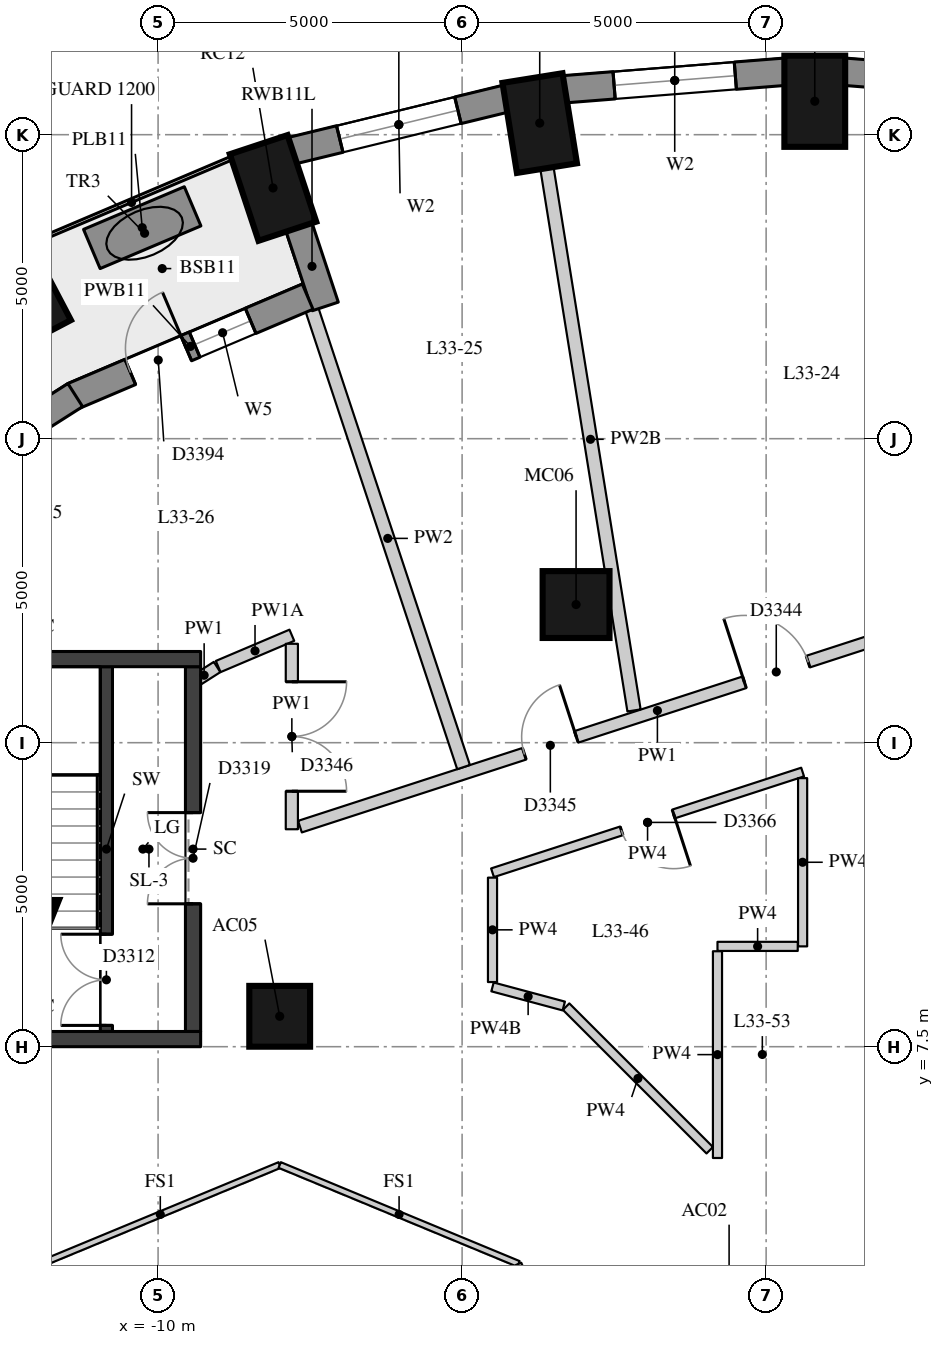
"""IFC4 building model, lengths in metres.
Left out: names, types, materials, properties, quantities, classifications, styles, units other than length and angle.
Written with IfcOpenShell. Run it as: python <this file> out.ifc"""

import sys

from ifc_helpers import new_model, si_unit, direction, frame, frame_2d, origin, origin_2d, place, context, subcontext, project, spatial, rectangle, extrude, element, fill, save


model = new_model("IFC4")
c1 = context("Model", 3, precision=1e-05, world=origin(), true_north=direction((0.0, 1.0)))
c2 = subcontext(c1, "Body", "Model", "MODEL_VIEW")
j1 = project(units=[si_unit("LENGTHUNIT", "METRE"), si_unit("PLANEANGLEUNIT", "RADIAN")], contexts=[c1])
p1 = place(None, origin())
s1 = spatial("IfcSite", under=j1, at=p1, CompositionType="ELEMENT")
p2 = place(p1, origin())
s2 = spatial("IfcBuilding", under=s1, at=p2, CompositionType="ELEMENT")
p3 = place(p2, frame((0.0, 0.0, 118.6)))
s3 = spatial("IfcBuildingStorey", under=s2, at=p3, CompositionType="ELEMENT", Elevation=118.6)
for number, where, z_axis, x_axis in (
    (1, (0.8, 23.05, 0.0), (0.0, 0.0, 1.0), (0.0, 1.0, 0.0)),
    (2, (-3.724, 22.691, 0.0), (0.0, 0.0, 1.0), (-0.159, 0.987, 0.0)),
    (3, (-8.11, 21.624, 0.0), (0.0, 0.0, 1.0), (-0.315, 0.949, 0.0)),
    (4, (-12.225, 19.882, 0.0), (0.0, 0.0, 1.0), (-0.465, 0.885, 0.0)),
):
    element("IfcColumn", number, at=place(p3, frame(where, z_axis=z_axis, x_axis=x_axis)), inside=s3, PredefinedType="COLUMN", context=c2, shape_type="SweptSolid", body=[
        extrude(rectangle(XDim=1.5, YDim=1.0, at=origin_2d()), origin(), (0.0, 0.0, 1.0), 3.3),
    ])
p4 = place(p3, frame((-8.0, 8.0, 0.0), z_axis=(0.0, 0.0, 1.0), x_axis=(1.0, 0.0, 0.0)))
e5 = element("IfcColumn", 5, at=p4, inside=s3, PredefinedType="COLUMN", context=c2, shape_type="SweptSolid", body=[
    extrude(rectangle(XDim=1.0, YDim=1.0, at=origin_2d()), origin(), (0.0, 0.0, 1.0), 3.3),
])
p5 = place(p3, frame((-3.126, 14.772, 0.0), z_axis=(0.0, 0.0, 1.0), x_axis=(1.0, 0.0, 0.0)))
e6 = element("IfcColumn", 6, at=p5, inside=s3, PredefinedType="COLUMN", context=c2, shape_type="SweptSolid", body=[
    extrude(rectangle(XDim=1.1, YDim=1.1, at=origin_2d()), origin(), (0.0, 0.0, 1.0), 3.3),
])
p6 = place(p3, frame((4.927, 23.247, 0.0), z_axis=(0.0, 0.0, 1.0), x_axis=(-0.996862216754, 0.079156306178, 0.0)))
e7 = element("IfcWall", 7, at=p6, inside=s3, PredefinedType="SOLIDWALL", context=c2, shape_type="SweptSolid", body=[
    extrude(rectangle(XDim=3.658, YDim=0.45, at=frame_2d((1.829, 0.0))), origin(), (0.0, 0.0, 1.0), 3.02),
])
p7 = place(p6, frame((0.829, 0.0, 0.4)))
e8 = element("IfcOpeningElement", 8, at=p7, cuts=e7, PredefinedType="OPENING", context=c2, shape_type="SweptSolid", body=[
    extrude(rectangle(XDim=2.0, YDim=1.75, at=frame_2d((1.0, 0.875))), frame((0.0, 0.235, 0.0), z_axis=(0.0, -1.0, 0.0), x_axis=(1.0, 0.0, 0.0)), (0.0, 0.0, 1.0), 0.47),
])
p8 = place(p3, frame((0.32, 23.536, 0.0), z_axis=(0.0, 0.0, 1.0), x_axis=(-0.996862216754, -0.079156306178, 0.0)))
e9 = element("IfcWall", 9, at=p8, inside=s3, PredefinedType="SOLIDWALL", context=c2, shape_type="SweptSolid", body=[
    extrude(rectangle(XDim=3.658, YDim=0.45, at=frame_2d((1.829, 0.0))), origin(), (0.0, 0.0, 1.0), 3.02),
])
p9 = place(p8, frame((0.829, 0.0, 0.4)))
e10 = element("IfcOpeningElement", 10, at=p9, cuts=e9, PredefinedType="OPENING", context=c2, shape_type="SweptSolid", body=[
    extrude(rectangle(XDim=2.0, YDim=1.75, at=frame_2d((1.0, 0.875))), frame((0.0, 0.235, 0.0), z_axis=(0.0, -1.0, 0.0), x_axis=(1.0, 0.0, 0.0)), (0.0, 0.0, 1.0), 0.47),
])
p10 = place(p3, frame((-4.275, 23.094, 0.0), z_axis=(0.0, 0.0, 1.0), x_axis=(-0.971667603162, -0.236351579148, 0.0)))
e11 = element("IfcWall", 11, at=p10, inside=s3, PredefinedType="SOLIDWALL", context=c2, shape_type="SweptSolid", body=[
    extrude(rectangle(XDim=3.635, YDim=0.45, at=frame_2d((1.817, 0.0))), origin(), (0.0, 0.0, 1.0), 3.02),
])
p11 = place(p10, frame((0.817, 0.0, 0.4)))
e12 = element("IfcOpeningElement", 12, at=p11, cuts=e11, PredefinedType="OPENING", context=c2, shape_type="SweptSolid", body=[
    extrude(rectangle(XDim=2.0, YDim=1.75, at=frame_2d((1.0, 0.875))), frame((0.0, 0.235, 0.0), z_axis=(0.0, -1.0, 0.0), x_axis=(1.0, 0.0, 0.0)), (0.0, 0.0, 1.0), 0.47),
])
p12 = place(p3, frame((-7.687, 20.995, 0.0), z_axis=(0.0, 0.0, 1.0), x_axis=(0.314541283205, -0.949243794375, 0.0)))
e13 = element("IfcWall", 13, at=p12, inside=s3, PredefinedType="SOLIDWALL", context=c2, shape_type="SweptSolid", body=[
    extrude(rectangle(XDim=1.39, YDim=0.45, at=frame_2d((0.695, 0.0))), origin(), (0.0, 0.0, 1.0), 3.02),
])
p13 = place(p3, frame((-7.54, 19.836, 0.0), z_axis=(0.0, 0.0, 1.0), x_axis=(-0.920502375708, -0.390736965637, 0.0)))
e14 = element("IfcWall", 14, at=p13, inside=s3, PredefinedType="SOLIDWALL", context=c2, shape_type="SweptSolid", body=[
    extrude(rectangle(XDim=4.188, YDim=0.45, at=frame_2d((2.094, 0.0))), origin(), (0.0, 0.0, 1.0), 3.02),
])
p14 = place(p13, frame((1.019, 0.0, 0.4)))
e15 = element("IfcOpeningElement", 15, at=p14, cuts=e14, PredefinedType="OPENING", context=c2, shape_type="SweptSolid", body=[
    extrude(rectangle(XDim=1.0, YDim=1.75, at=frame_2d((0.5, 0.875))), frame((0.0, 0.235, 0.0), z_axis=(0.0, -1.0, 0.0), x_axis=(1.0, 0.0, 0.0)), (0.0, 0.0, 1.0), 0.47),
])
p15 = place(p13, frame((2.169, 0.0, 0.0)))
e16 = element("IfcOpeningElement", 16, at=p15, cuts=e14, PredefinedType="OPENING", context=c2, shape_type="SweptSolid", body=[
    extrude(rectangle(XDim=1.0, YDim=2.15, at=frame_2d((0.5, 1.075))), frame((0.0, 0.235, 0.0), z_axis=(0.0, -1.0, 0.0), x_axis=(1.0, 0.0, 0.0)), (0.0, 0.0, 1.0), 0.47),
])
p16 = place(p3, frame((-11.362, 18.217, 0.0), z_axis=(0.0, 0.0, 1.0), x_axis=(-0.843284405788, -0.537467590609, 0.0)))
e17 = element("IfcWall", 17, at=p16, inside=s3, PredefinedType="SOLIDWALL", context=c2, shape_type="SweptSolid", body=[
    extrude(rectangle(XDim=4.135, YDim=0.45, at=frame_2d((2.067, 0.0))), origin(), (0.0, 0.0, 1.0), 3.02),
])
p17 = place(p16, frame((0.992, 0.0, 0.4)))
e18 = element("IfcOpeningElement", 18, at=p17, cuts=e17, PredefinedType="OPENING", context=c2, shape_type="SweptSolid", body=[
    extrude(rectangle(XDim=1.0, YDim=1.75, at=frame_2d((0.5, 0.875))), frame((0.0, 0.235, 0.0), z_axis=(0.0, -1.0, 0.0), x_axis=(1.0, 0.0, 0.0)), (0.0, 0.0, 1.0), 0.47),
])
p18 = place(p16, frame((2.142, 0.0, 0.0)))
e19 = element("IfcOpeningElement", 19, at=p18, cuts=e17, PredefinedType="OPENING", context=c2, shape_type="SweptSolid", body=[
    extrude(rectangle(XDim=1.0, YDim=2.15, at=frame_2d((0.5, 1.075))), frame((0.0, 0.235, 0.0), z_axis=(0.0, -1.0, 0.0), x_axis=(1.0, 0.0, 0.0)), (0.0, 0.0, 1.0), 0.47),
])
p19 = place(p3, frame((-9.432, 21.322, 0.0), z_axis=(0.0, 0.0, 1.0), x_axis=(-0.920903594752, -0.389790416984, 0.0)))
e20 = element("IfcWall", 20, at=p19, inside=s3, PredefinedType="USERDEFINED", context=c2, shape_type="SweptSolid", body=[
    extrude(rectangle(XDim=1.8, YDim=0.7, at=frame_2d((0.9, 0.0))), origin(), (0.0, 0.0, 1.0), 0.75),
])
p20 = place(p3, frame((-10.85, 7.75, 0.0), z_axis=(0.0, 0.0, 1.0), x_axis=(0.0, 1.0, 0.0)))
e21 = element("IfcWall", 21, at=p20, inside=s3, PredefinedType="SHEAR", context=c2, shape_type="SweptSolid", body=[
    extrude(rectangle(XDim=6.0, YDim=0.2, at=frame_2d((3.0, 0.0))), origin(), (0.0, 0.0, 1.0), 3.02),
])
p21 = place(p20, frame((0.1, 0.0, 0.0)))
e22 = element("IfcOpeningElement", 22, at=p21, cuts=e21, PredefinedType="OPENING", context=c2, shape_type="SweptSolid", body=[
    extrude(rectangle(XDim=1.5, YDim=2.1, at=frame_2d((0.75, 1.05))), frame((0.0, 0.11, 0.0), z_axis=(0.0, -1.0, 0.0), x_axis=(1.0, 0.0, 0.0)), (0.0, 0.0, 1.0), 0.22),
])
p22 = place(p3, frame((-9.425, 7.75, -0.28), z_axis=(0.0, 0.0, 1.0), x_axis=(0.0, 1.0, 0.0)))
e23 = element("IfcWall", 23, at=p22, inside=s3, PredefinedType="SHEAR", context=c2, shape_type="SweptSolid", body=[
    extrude(rectangle(XDim=6.0, YDim=0.25, at=frame_2d((3.0, 0.0))), origin(), (0.0, 0.0, 1.0), 3.3),
])
p23 = place(p22, frame((2.1, 0.0, 0.28)))
e24 = element("IfcOpeningElement", 24, at=p23, cuts=e23, PredefinedType="OPENING", context=c2, shape_type="SweptSolid", body=[
    extrude(rectangle(XDim=1.5, YDim=2.1, at=frame_2d((0.75, 1.05))), frame((0.0, 0.135, 0.0), z_axis=(0.0, -1.0, 0.0), x_axis=(1.0, 0.0, 0.0)), (0.0, 0.0, 1.0), 0.27),
])
for number, where, z_axis, x_axis in (
    (25, (-14.5, 13.875, -0.28), (0.0, 0.0, 1.0), (1.0, 0.0, 0.0)),
    (26, (-14.5, 7.625, -0.28), (0.0, 0.0, 1.0), (1.0, 0.0, 0.0)),
):
    element("IfcWall", number, at=place(p3, frame(where, z_axis=z_axis, x_axis=x_axis)), inside=s3, PredefinedType="SHEAR", context=c2, shape_type="SweptSolid", body=[
        extrude(rectangle(XDim=5.2, YDim=0.25, at=frame_2d((2.6, 0.0))), origin(), (0.0, 0.0, 1.0), 3.3),
    ])
p24 = place(p3, frame((-9.455, 13.474, 0.0), z_axis=(0.0, 0.0, 1.0), x_axis=(0.843342387181, 0.537376607216, 0.0)))
e27 = element("IfcWall", 27, at=p24, inside=s3, PredefinedType="PARTITIONING", context=c2, shape_type="SweptSolid", body=[
    extrude(rectangle(XDim=0.504, YDim=0.2, at=frame_2d((0.252, 0.0))), origin(), (0.0, 0.0, 1.0), 3.02),
])
p25 = place(p3, frame((-9.011, 13.752, 0.0), z_axis=(0.0, 0.0, 1.0), x_axis=(0.920454408747, 0.390849947446, 0.0)))
e28 = element("IfcWall", 28, at=p25, inside=s3, PredefinedType="PARTITIONING", context=c2, shape_type="SweptSolid", body=[
    extrude(rectangle(XDim=1.316, YDim=0.2, at=frame_2d((0.658, 0.0))), origin(), (0.0, 0.0, 1.0), 2.57),
])
p26 = place(p3, frame((-7.8, 14.127, 0.0), z_axis=(0.0, 0.0, 1.0), x_axis=(0.0, -1.0, 0.0)))
e29 = element("IfcWall", 29, at=p26, inside=s3, PredefinedType="PARTITIONING", context=c2, shape_type="SweptSolid", body=[
    extrude(rectangle(XDim=3.05, YDim=0.2, at=frame_2d((1.525, 0.0))), origin(), (0.0, 0.0, 1.0), 3.02),
])
p27 = place(p26, frame((0.625, 0.0, 0.0)))
e30 = element("IfcOpeningElement", 30, at=p27, cuts=e29, PredefinedType="OPENING", context=c2, shape_type="SweptSolid", body=[
    extrude(rectangle(XDim=1.8, YDim=2.1, at=frame_2d((0.9, 1.05))), frame((0.0, 0.11, 0.0), z_axis=(0.0, -1.0, 0.0), x_axis=(1.0, 0.0, 0.0)), (0.0, 0.0, 1.0), 0.22),
])
p28 = place(p3, frame((-7.667, 11.119, 0.0), z_axis=(0.0, 0.0, 1.0), x_axis=(0.951088334028, 0.308919052304, 0.0)))
e31 = element("IfcWall", 31, at=p28, inside=s3, PredefinedType="PARTITIONING", context=c2, shape_type="SweptSolid", body=[
    extrude(rectangle(XDim=12.362, YDim=0.2, at=frame_2d((6.181, 0.0))), origin(), (0.0, 0.0, 1.0), 3.02),
])
p29 = place(p28, frame((7.686, 0.0, 0.0)))
e32 = element("IfcOpeningElement", 32, at=p29, cuts=e31, PredefinedType="OPENING", context=c2, shape_type="SweptSolid", body=[
    extrude(rectangle(XDim=1.1, YDim=2.1, at=frame_2d((0.55, 1.05))), frame((0.0, 0.11, 0.0), z_axis=(0.0, -1.0, 0.0), x_axis=(1.0, 0.0, 0.0)), (0.0, 0.0, 1.0), 0.22),
])
p30 = place(p28, frame((3.88, 0.0, 0.0)))
e33 = element("IfcOpeningElement", 33, at=p30, cuts=e31, PredefinedType="OPENING", context=c2, shape_type="SweptSolid", body=[
    extrude(rectangle(XDim=0.9, YDim=2.1, at=frame_2d((0.45, 1.05))), frame((0.0, 0.11, 0.0), z_axis=(0.0, -1.0, 0.0), x_axis=(1.0, 0.0, 0.0)), (0.0, 0.0, 1.0), 0.22),
])
p31 = place(p3, frame((-4.5, 10.361, 0.0), z_axis=(0.0, 0.0, 1.0), x_axis=(0.951090931116, 0.308911056372, 0.0)))
e34 = element("IfcWall", 34, at=p31, inside=s3, PredefinedType="PARTITIONING", context=c2, shape_type="SweptSolid", body=[
    extrude(rectangle(XDim=5.362, YDim=0.15, at=frame_2d((2.681, 0.0))), origin(), (0.0, 0.0, 1.0), 3.02),
])
p32 = place(p31, frame((2.231, 0.0, 0.0)))
e35 = element("IfcOpeningElement", 35, at=p32, cuts=e34, PredefinedType="OPENING", context=c2, shape_type="SweptSolid", body=[
    extrude(rectangle(XDim=0.9, YDim=2.1, at=frame_2d((0.45, 1.05))), frame((0.0, 0.085, 0.0), z_axis=(0.0, -1.0, 0.0), x_axis=(1.0, 0.0, 0.0)), (0.0, 0.0, 1.0), 0.17),
])
p33 = place(p3, frame((0.6, 11.917, 0.0), z_axis=(0.0, 0.0, 1.0), x_axis=(0.0, -1.0, 0.0)))
e36 = element("IfcWall", 36, at=p33, inside=s3, PredefinedType="PARTITIONING", context=c2, shape_type="SweptSolid", body=[
    extrude(rectangle(XDim=2.767, YDim=0.15, at=frame_2d((1.384, 0.0))), origin(), (0.0, 0.0, 1.0), 3.02),
])
p34 = place(p3, frame((0.52, 9.15, 0.0), z_axis=(0.0, 0.0, 1.0), x_axis=(-1.0, 0.0, 0.0)))
e37 = element("IfcWall", 37, at=p34, inside=s3, PredefinedType="PARTITIONING", context=c2, shape_type="SweptSolid", body=[
    extrude(rectangle(XDim=1.32, YDim=0.15, at=frame_2d((0.66, 0.0))), origin(), (0.0, 0.0, 1.0), 3.02),
])
p35 = place(p3, frame((-0.8, 9.07, 0.0), z_axis=(0.0, 0.0, 1.0), x_axis=(0.0, -1.0, 0.0)))
e38 = element("IfcWall", 38, at=p35, inside=s3, PredefinedType="PARTITIONING", context=c2, shape_type="SweptSolid", body=[
    extrude(rectangle(XDim=3.4, YDim=0.15, at=frame_2d((1.7, 0.0))), origin(), (0.0, 0.0, 1.0), 3.02),
])
p36 = place(p3, frame((-0.927, 5.797, 0.0), z_axis=(0.0, 0.0, 1.0), x_axis=(-0.707106781187, 0.707106781187, 0.0)))
e39 = element("IfcWall", 39, at=p36, inside=s3, PredefinedType="PARTITIONING", context=c2, shape_type="SweptSolid", body=[
    extrude(rectangle(XDim=3.341, YDim=0.15, at=frame_2d((1.67, 0.0))), origin(), (0.0, 0.0, 1.0), 3.02),
])
p37 = place(p3, frame((-3.328, 8.169, 0.0), z_axis=(0.0, 0.0, 1.0), x_axis=(-0.965933680277, 0.258789731841, 0.0)))
e40 = element("IfcWall", 40, at=p37, inside=s3, PredefinedType="PARTITIONING", context=c2, shape_type="SweptSolid", body=[
    extrude(rectangle(XDim=1.213, YDim=0.15, at=frame_2d((0.606, 0.0))), origin(), (0.0, 0.0, 1.0), 2.47),
])
p38 = place(p3, frame((-4.5, 8.563, 0.0), z_axis=(0.0, 0.0, 1.0), x_axis=(0.0, 1.0, 0.0)))
e41 = element("IfcWall", 41, at=p38, inside=s3, PredefinedType="PARTITIONING", context=c2, shape_type="SweptSolid", body=[
    extrude(rectangle(XDim=1.717, YDim=0.15, at=frame_2d((0.859, 0.0))), origin(), (0.0, 0.0, 1.0), 3.02),
])
p39 = place(p3, frame((-3.605, 21.95, 0.0), z_axis=(0.0, 0.0, 1.0), x_axis=(0.158519564718, -0.987355836364, 0.0)))
e42 = element("IfcWall", 42, at=p39, inside=s3, PredefinedType="PARTITIONING", context=c2, shape_type="SweptSolid", body=[
    extrude(rectangle(XDim=9.034, YDim=0.22, at=frame_2d((4.517, 0.0))), origin(), (0.0, 0.0, 1.0), 2.57),
])
p40 = place(p3, frame((-7.469, 19.622, 0.0), z_axis=(0.0, 0.0, 1.0), x_axis=(0.314545340174, -0.949242450049, 0.0)))
e43 = element("IfcWall", 43, at=p40, inside=s3, PredefinedType="PARTITIONING", context=c2, shape_type="SweptSolid", body=[
    extrude(rectangle(XDim=7.926, YDim=0.22, at=frame_2d((3.963, 0.0))), origin(), (0.0, 0.0, 1.0), 3.02),
])
for number, where, z_axis, x_axis in (
    (44, (-11.927, 3.927, 0.0), (0.0, 0.0, 1.0), (0.924, 0.383, 0.0)),
    (45, (-8.0, 5.554, 0.0), (0.0, 0.0, 1.0), (0.924, -0.383, 0.0)),
    (46, (-4.073, 3.927, 0.0), (0.0, 0.0, 1.0), (0.383, -0.924, 0.0)),
):
    element("IfcWall", number, at=place(p3, frame(where, z_axis=z_axis, x_axis=x_axis)), inside=s3, PredefinedType="PARTITIONING", context=c2, shape_type="SweptSolid", body=[
        extrude(rectangle(XDim=4.251, YDim=0.1, at=frame_2d((2.125, 0.0))), origin(), (0.0, 0.0, 1.0), 3.02),
    ])
p41 = place(p9, origin())
e47 = element("IfcWindow", 47, at=p41, inside=s3, PartitioningType="SINGLE_PANEL", PredefinedType="WINDOW", context=c2, shape_type="SweptSolid", body=[
    extrude(rectangle(XDim=2.0, YDim=1.75, at=frame_2d((1.0, 0.875))), frame((0.0, 0.035, 0.0), z_axis=(0.0, -1.0, 0.0), x_axis=(1.0, 0.0, 0.0)), (0.0, 0.0, 1.0), 0.06),
])
fill(e10, e47)
p42 = place(p11, origin())
e48 = element("IfcWindow", 48, at=p42, inside=s3, PartitioningType="SINGLE_PANEL", PredefinedType="WINDOW", context=c2, shape_type="SweptSolid", body=[
    extrude(rectangle(XDim=2.0, YDim=1.75, at=frame_2d((1.0, 0.875))), frame((0.0, 0.035, 0.0), z_axis=(0.0, -1.0, 0.0), x_axis=(1.0, 0.0, 0.0)), (0.0, 0.0, 1.0), 0.06),
])
fill(e12, e48)
p43 = place(p14, origin())
e49 = element("IfcWindow", 49, at=p43, inside=s3, PartitioningType="SINGLE_PANEL", PredefinedType="WINDOW", context=c2, shape_type="SweptSolid", body=[
    extrude(rectangle(XDim=1.0, YDim=1.75, at=frame_2d((0.5, 0.875))), frame((0.0, 0.035, 0.0), z_axis=(0.0, -1.0, 0.0), x_axis=(1.0, 0.0, 0.0)), (0.0, 0.0, 1.0), 0.06),
])
fill(e15, e49)
p44 = place(p15, frame((1.0, 0.0, 0.0), z_axis=(0.0, 0.0, 1.0), x_axis=(-1.0, 0.0, 0.0)))
e50 = element("IfcDoor", 50, at=p44, inside=s3, OperationType="SINGLE_SWING_RIGHT", PredefinedType="DOOR", context=c2, shape_type="SweptSolid", body=[
    extrude(rectangle(XDim=1.0, YDim=2.15, at=frame_2d((0.5, 1.075))), frame((0.0, 0.075, 0.0), z_axis=(0.0, -1.0, 0.0), x_axis=(1.0, 0.0, 0.0)), (0.0, 0.0, 1.0), 0.05),
])
fill(e16, e50)
p45 = place(p21, origin())
e51 = element("IfcDoor", 51, at=p45, inside=s3, OperationType="DOUBLE_DOOR_SINGLE_SWING", PredefinedType="DOOR", context=c2, shape_type="SweptSolid", body=[
    extrude(rectangle(XDim=1.5, YDim=2.1, at=frame_2d((0.75, 1.05))), frame((0.0, 0.025, 0.0), z_axis=(0.0, -1.0, 0.0), x_axis=(1.0, 0.0, 0.0)), (0.0, 0.0, 1.0), 0.05),
])
fill(e22, e51)
p46 = place(p23, origin())
e52 = element("IfcDoor", 52, at=p46, inside=s3, OperationType="DOUBLE_DOOR_SINGLE_SWING", PredefinedType="DOOR", context=c2, shape_type="SweptSolid", body=[
    extrude(rectangle(XDim=1.5, YDim=2.1, at=frame_2d((0.75, 1.05))), frame((0.0, 0.025, 0.0), z_axis=(0.0, -1.0, 0.0), x_axis=(1.0, 0.0, 0.0)), (0.0, 0.0, 1.0), 0.05),
])
fill(e24, e52)
p47 = place(p29, origin())
e53 = element("IfcDoor", 53, at=p47, inside=s3, OperationType="SINGLE_SWING_LEFT", PredefinedType="DOOR", context=c2, shape_type="SweptSolid", body=[
    extrude(rectangle(XDim=1.1, YDim=2.1, at=frame_2d((0.55, 1.05))), frame((0.0, 0.025, 0.0), z_axis=(0.0, -1.0, 0.0), x_axis=(1.0, 0.0, 0.0)), (0.0, 0.0, 1.0), 0.05),
])
fill(e32, e53)
p48 = place(p30, origin())
e54 = element("IfcDoor", 54, at=p48, inside=s3, OperationType="SINGLE_SWING_RIGHT", PredefinedType="DOOR", context=c2, shape_type="SweptSolid", body=[
    extrude(rectangle(XDim=0.9, YDim=2.1, at=frame_2d((0.45, 1.05))), frame((0.0, 0.025, 0.0), z_axis=(0.0, -1.0, 0.0), x_axis=(1.0, 0.0, 0.0)), (0.0, 0.0, 1.0), 0.05),
])
fill(e33, e54)
p49 = place(p27, origin())
e55 = element("IfcDoor", 55, at=p49, inside=s3, OperationType="DOUBLE_DOOR_SINGLE_SWING", PredefinedType="DOOR", context=c2, shape_type="SweptSolid", body=[
    extrude(rectangle(XDim=1.8, YDim=2.1, at=frame_2d((0.9, 1.05))), frame((0.0, 0.025, 0.0), z_axis=(0.0, -1.0, 0.0), x_axis=(1.0, 0.0, 0.0)), (0.0, 0.0, 1.0), 0.05),
])
fill(e30, e55)
p50 = place(p32, origin())
e56 = element("IfcDoor", 56, at=p50, inside=s3, OperationType="SINGLE_SWING_LEFT", PredefinedType="DOOR", context=c2, shape_type="SweptSolid", body=[
    extrude(rectangle(XDim=0.9, YDim=2.1, at=frame_2d((0.45, 1.05))), frame((0.0, 0.025, 0.0), z_axis=(0.0, -1.0, 0.0), x_axis=(1.0, 0.0, 0.0)), (0.0, 0.0, 1.0), 0.05),
])
fill(e35, e56)
save(model, sys.argv[1])
